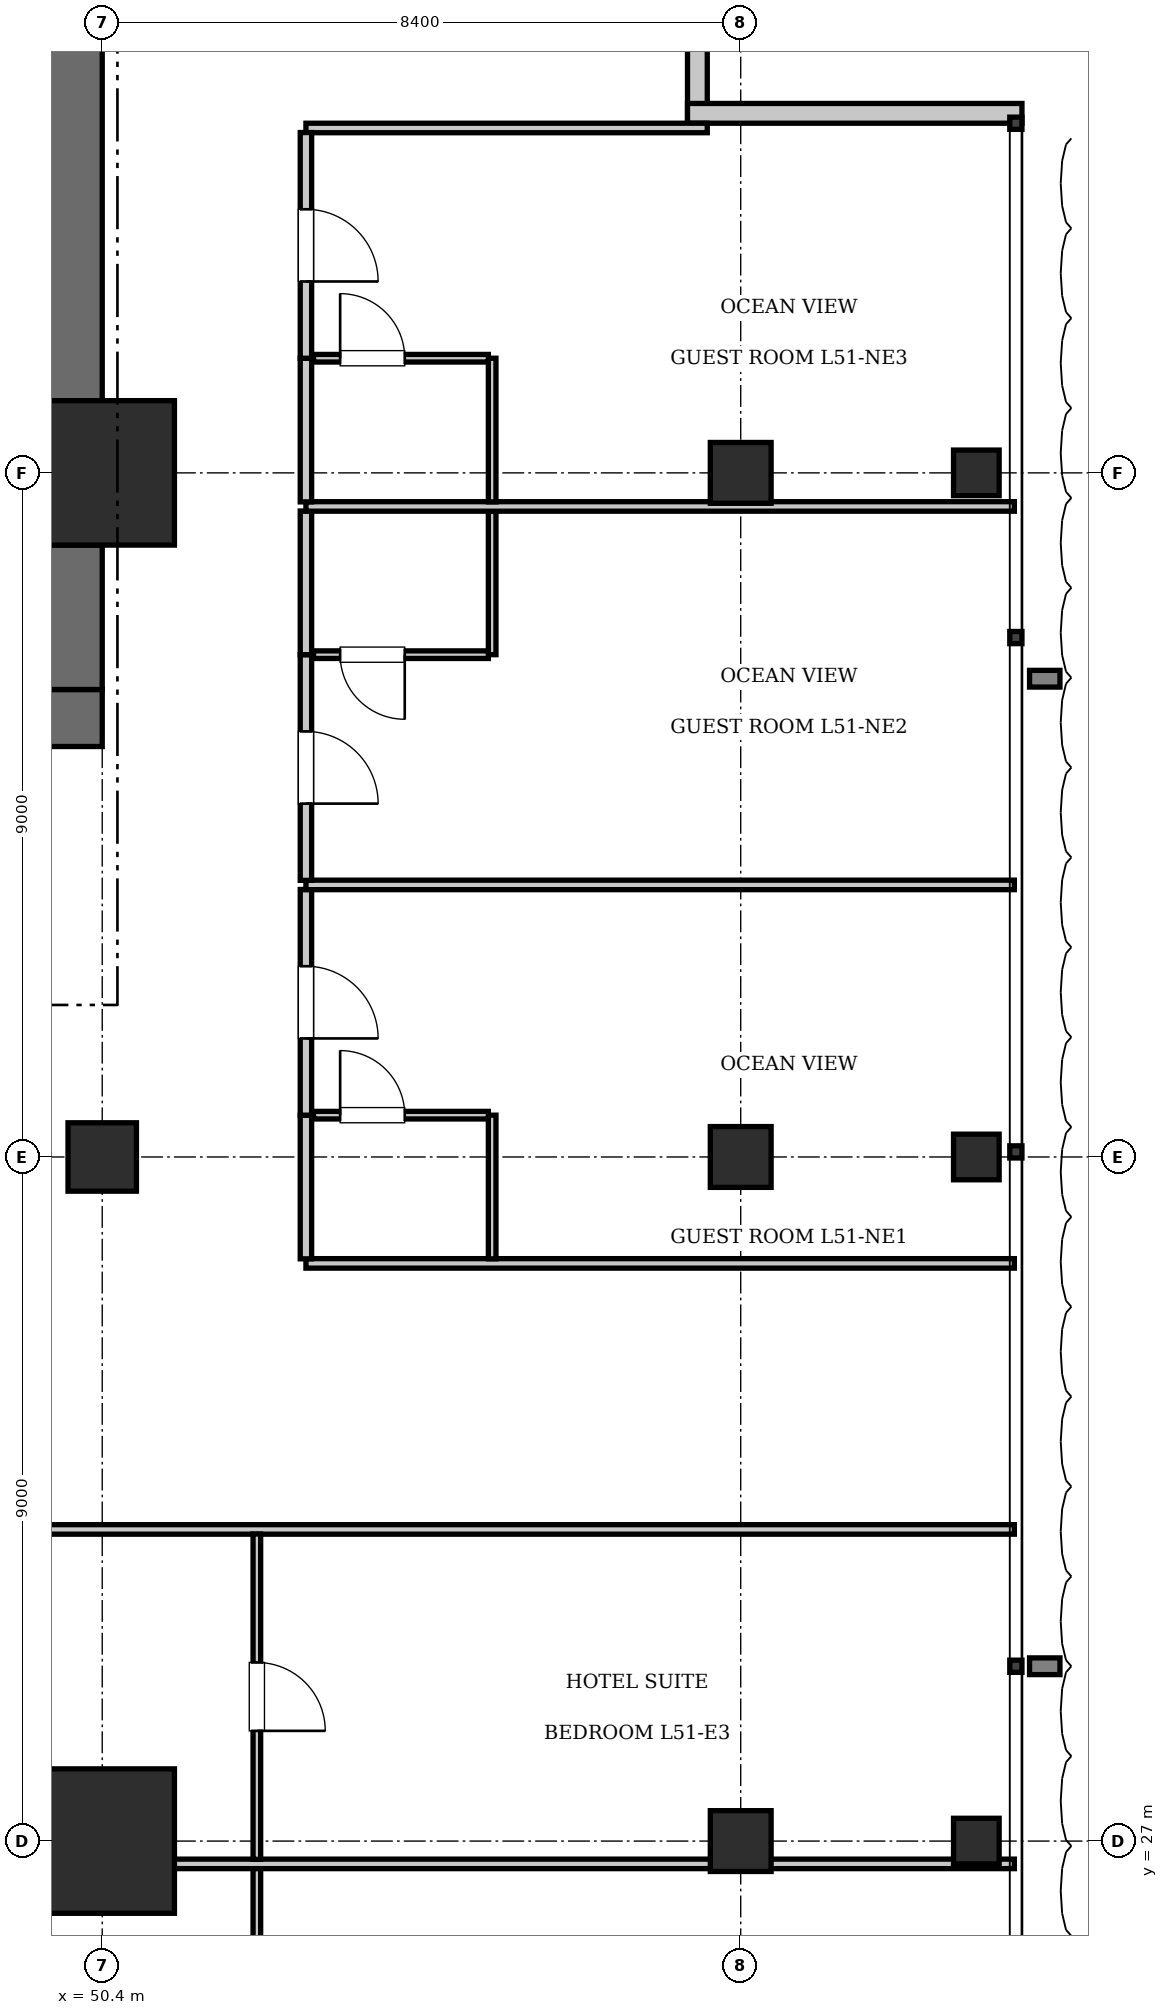
"""IFC4 building model, lengths in metres.
Left out: names, types, materials, properties, quantities, classifications, styles, units other than length and angle.
Written with IfcOpenShell. Run it as: python <this file> out.ifc"""

import sys

from ifc_helpers import new_model, si_unit, direction, frame, frame_2d, origin, origin_2d, place, context, subcontext, project, spatial, rectangle, i_section, extrude, element, fill, save


model = new_model("IFC4")
c1 = context("Model", 3, precision=1e-05, world=origin(), true_north=direction((0.0, 1.0)))
c2 = subcontext(c1, "Body", "Model", "MODEL_VIEW")
j1 = project(units=[si_unit("LENGTHUNIT", "METRE"), si_unit("PLANEANGLEUNIT", "RADIAN")], contexts=[c1])
p1 = place(None, origin())
s1 = spatial("IfcSite", under=j1, at=p1, CompositionType="ELEMENT")
p2 = place(p1, origin())
s2 = spatial("IfcBuilding", under=s1, at=p2, CompositionType="ELEMENT")
p3 = place(p2, frame((0.0, 0.0, 208.25)))
s3 = spatial("IfcBuildingStorey", under=s2, at=p3, CompositionType="ELEMENT", Elevation=208.25)
for number, where, z_axis, x_axis in (
    (1, (50.4, 27.0, 0.0), (0.0, 0.0, 1.0), (1.0, 0.0, 0.0)),
    (2, (50.4, 45.0, 0.0), (0.0, 0.0, 1.0), (1.0, 0.0, 0.0)),
):
    element("IfcColumn", number, at=place(p3, frame(where, z_axis=z_axis, x_axis=x_axis)), inside=s3, PredefinedType="COLUMN", context=c2, shape_type="SweptSolid", body=[
        extrude(rectangle(XDim=1.9, YDim=1.9, at=origin_2d()), origin(), (0.0, 0.0, 1.0), 3.85),
    ])
p4 = place(p3, frame((43.6, 41.775, 0.0), z_axis=(0.0, 0.0, 1.0), x_axis=(1.0, 0.0, 0.0)))
e3 = element("IfcWall", 3, at=p4, inside=s3, PredefinedType="SHEAR", context=c2, shape_type="SweptSolid", body=[
    extrude(rectangle(XDim=6.8, YDim=0.75, at=frame_2d((3.4, 0.0))), origin(), (0.0, 0.0, 1.0), 3.85),
])
p5 = place(p4, frame((3.9, 0.0, 0.0)))
e4 = element("IfcOpeningElement", 4, at=p5, cuts=e3, PredefinedType="OPENING", context=c2, shape_type="SweptSolid", body=[
    extrude(rectangle(XDim=1.15, YDim=2.15, at=frame_2d((0.575, 1.075))), frame((0.0, 0.385, 0.0), z_axis=(0.0, -1.0, 0.0), x_axis=(1.0, 0.0, 0.0)), (0.0, 0.0, 1.0), 0.77),
])
p6 = place(p4, frame((0.55, 0.0, 0.0)))
e5 = element("IfcOpeningElement", 5, at=p6, cuts=e3, PredefinedType="OPENING", context=c2, shape_type="SweptSolid", body=[
    extrude(rectangle(XDim=1.1, YDim=2.2, at=frame_2d((0.55, 1.1))), frame((0.0, 0.385, 0.0), z_axis=(0.0, -1.0, 0.0), x_axis=(1.0, 0.0, 0.0)), (0.0, 0.0, 1.0), 0.77),
])
p7 = place(p3, frame((50.025, 42.15, 0.0), z_axis=(0.0, 0.0, 1.0), x_axis=(0.0, 1.0, 0.0)))
e6 = element("IfcWall", 6, at=p7, inside=s3, PredefinedType="SHEAR", context=c2, shape_type="SweptSolid", body=[
    extrude(rectangle(XDim=1.9, YDim=0.75, at=frame_2d((0.95, 0.0))), origin(), (0.0, 0.0, 1.0), 3.85),
])
p8 = place(p3, frame((50.025, 45.95, 0.0), z_axis=(0.0, 0.0, 1.0), x_axis=(0.0, 1.0, 0.0)))
e7 = element("IfcWall", 7, at=p8, inside=s3, PredefinedType="SHEAR", context=c2, shape_type="SweptSolid", body=[
    extrude(rectangle(XDim=7.3, YDim=0.75, at=frame_2d((3.65, 0.0))), origin(), (0.0, 0.0, 1.0), 3.85),
])
p9 = place(p3, frame((50.4, 36.0, 0.0), z_axis=(0.0, 0.0, 1.0), x_axis=(1.0, 0.0, 0.0)))
e8 = element("IfcColumn", 8, at=p9, inside=s3, PredefinedType="COLUMN", context=c2, shape_type="SweptSolid", body=[
    extrude(rectangle(XDim=0.9, YDim=0.9, at=origin_2d()), origin(), (0.0, 0.0, 1.0), 3.85),
])
for number, where, z_axis, x_axis in (
    (9, (58.8, 27.0, 0.0), (0.0, 0.0, 1.0), (1.0, 0.0, 0.0)),
    (10, (58.8, 36.0, 0.0), (0.0, 0.0, 1.0), (1.0, 0.0, 0.0)),
    (11, (58.8, 45.0, 0.0), (0.0, 0.0, 1.0), (1.0, 0.0, 0.0)),
):
    element("IfcColumn", number, at=place(p3, frame(where, z_axis=z_axis, x_axis=x_axis)), inside=s3, PredefinedType="COLUMN", context=c2, shape_type="SweptSolid", body=[
        extrude(rectangle(XDim=0.8, YDim=0.8, at=origin_2d()), origin(), (0.0, 0.0, 1.0), 3.85),
    ])
for number, where, z_axis, x_axis in (
    (12, (61.9, 27.0, 0.0), (0.0, 0.0, 1.0), (1.0, 0.0, 0.0)),
    (13, (61.9, 36.0, 0.0), (0.0, 0.0, 1.0), (1.0, 0.0, 0.0)),
    (14, (61.9, 45.0, 0.0), (0.0, 0.0, 1.0), (1.0, 0.0, 0.0)),
):
    element("IfcColumn", number, at=place(p3, frame(where, z_axis=z_axis, x_axis=x_axis)), inside=s3, PredefinedType="COLUMN", context=c2, shape_type="SweptSolid", body=[
        extrude(i_section(OverallWidth=0.6, OverallDepth=0.6, WebThickness=0.025, FlangeThickness=0.038, at=origin_2d()), origin(), (0.0, 0.0, 1.0), 3.85),
    ])
for number, where, z_axis, x_axis in (
    (15, (58.23, 54.0, 0.0), (0.0, 0.0, 1.0), (0.0, -1.0, 0.0)),
    (16, (58.1, 49.73, 0.0), (0.0, 0.0, 1.0), (1.0, 0.0, 0.0)),
):
    element("IfcWall", number, at=place(p3, frame(where, z_axis=z_axis, x_axis=x_axis)), inside=s3, PredefinedType="SOLIDWALL", context=c2, shape_type="SweptSolid", body=[
        extrude(rectangle(XDim=4.4, YDim=0.26, at=frame_2d((2.2, 0.0))), origin(), (0.0, 0.0, 1.0), 3.61),
    ])
p10 = place(p3, frame((39.08, 31.1, 0.0), z_axis=(0.0, 0.0, 1.0), x_axis=(1.0, 0.0, 0.0)))
e17 = element("IfcWall", 17, at=p10, inside=s3, PredefinedType="PARTITIONING", context=c2, shape_type="SweptSolid", body=[
    extrude(rectangle(XDim=23.32, YDim=0.125, at=frame_2d((11.66, 0.0))), origin(), (0.0, 0.0, 1.0), 3.61),
])
p11 = place(p3, frame((52.434, 22.36, 0.0), z_axis=(0.0, 0.0, 1.0), x_axis=(0.0, 1.0, 0.0)))
e18 = element("IfcWall", 18, at=p11, inside=s3, PredefinedType="PARTITIONING", context=c2, shape_type="SweptSolid", body=[
    extrude(rectangle(XDim=4.28, YDim=0.1, at=frame_2d((2.14, 0.0))), origin(), (0.0, 0.0, 1.0), 3.61),
])
p12 = place(p11, frame((1.69, 0.0, 0.0)))
e19 = element("IfcOpeningElement", 19, at=p12, cuts=e18, PredefinedType="OPENING", context=c2, shape_type="SweptSolid", body=[
    extrude(rectangle(XDim=0.9, YDim=2.1, at=frame_2d((0.45, 1.05))), frame((0.0, 0.06, 0.0), z_axis=(0.0, -1.0, 0.0), x_axis=(1.0, 0.0, 0.0)), (0.0, 0.0, 1.0), 0.12),
])
p13 = place(p3, frame((39.08, 26.7, 0.0), z_axis=(0.0, 0.0, 1.0), x_axis=(1.0, 0.0, 0.0)))
e20 = element("IfcWall", 20, at=p13, inside=s3, PredefinedType="PARTITIONING", context=c2, shape_type="SweptSolid", body=[
    extrude(rectangle(XDim=23.32, YDim=0.125, at=frame_2d((11.66, 0.0))), origin(), (0.0, 0.0, 1.0), 3.61),
])
p14 = place(p3, frame((52.434, 26.76, 0.0), z_axis=(0.0, 0.0, 1.0), x_axis=(0.0, 1.0, 0.0)))
e21 = element("IfcWall", 21, at=p14, inside=s3, PredefinedType="PARTITIONING", context=c2, shape_type="SweptSolid", body=[
    extrude(rectangle(XDim=4.28, YDim=0.1, at=frame_2d((2.14, 0.0))), origin(), (0.0, 0.0, 1.0), 3.61),
])
p15 = place(p14, frame((1.69, 0.0, 0.0)))
e22 = element("IfcOpeningElement", 22, at=p15, cuts=e21, PredefinedType="OPENING", context=c2, shape_type="SweptSolid", body=[
    extrude(rectangle(XDim=0.9, YDim=2.1, at=frame_2d((0.45, 1.05))), frame((0.0, 0.06, 0.0), z_axis=(0.0, -1.0, 0.0), x_axis=(1.0, 0.0, 0.0)), (0.0, 0.0, 1.0), 0.12),
])
p16 = place(p3, frame((53.08, 34.6, 0.0), z_axis=(0.0, 0.0, 1.0), x_axis=(1.0, 0.0, 0.0)))
e23 = element("IfcWall", 23, at=p16, inside=s3, PredefinedType="PARTITIONING", context=c2, shape_type="SweptSolid", body=[
    extrude(rectangle(XDim=9.32, YDim=0.125, at=frame_2d((4.66, 0.0))), origin(), (0.0, 0.0, 1.0), 3.61),
])
p17 = place(p3, frame((53.08, 49.538, 0.0), z_axis=(0.0, 0.0, 1.0), x_axis=(1.0, 0.0, 0.0)))
e24 = element("IfcWall", 24, at=p17, inside=s3, PredefinedType="PARTITIONING", context=c2, shape_type="SweptSolid", body=[
    extrude(rectangle(XDim=5.28, YDim=0.125, at=frame_2d((2.64, 0.0))), origin(), (0.0, 0.0, 1.0), 3.61),
])
p18 = place(p3, frame((53.08, 34.66, 0.0), z_axis=(0.0, 0.0, 1.0), x_axis=(0.0, 1.0, 0.0)))
e25 = element("IfcWall", 25, at=p18, inside=s3, PredefinedType="PARTITIONING", context=c2, shape_type="SweptSolid", body=[
    extrude(rectangle(XDim=1.89, YDim=0.15, at=frame_2d((0.945, 0.0))), origin(), (0.0, 0.0, 1.0), 3.61),
])
p19 = place(p3, frame((53.08, 36.55, 0.0), z_axis=(0.0, 0.0, 1.0), x_axis=(0.0, 1.0, 0.0)))
e26 = element("IfcWall", 26, at=p19, inside=s3, PredefinedType="PARTITIONING", context=c2, shape_type="SweptSolid", body=[
    extrude(rectangle(XDim=2.969, YDim=0.15, at=frame_2d((1.485, 0.0))), origin(), (0.0, 0.0, 1.0), 3.61),
])
p20 = place(p19, frame((1.01, 0.0, 0.0)))
e27 = element("IfcOpeningElement", 27, at=p20, cuts=e26, PredefinedType="OPENING", context=c2, shape_type="SweptSolid", body=[
    extrude(rectangle(XDim=0.95, YDim=2.15, at=frame_2d((0.475, 1.075))), frame((0.0, 0.085, 0.0), z_axis=(0.0, -1.0, 0.0), x_axis=(1.0, 0.0, 0.0)), (0.0, 0.0, 1.0), 0.17),
])
p21 = place(p3, frame((55.53, 34.66, 0.0), z_axis=(0.0, 0.0, 1.0), x_axis=(0.0, 1.0, 0.0)))
e28 = element("IfcWall", 28, at=p21, inside=s3, PredefinedType="PARTITIONING", context=c2, shape_type="SweptSolid", body=[
    extrude(rectangle(XDim=1.89, YDim=0.1, at=frame_2d((0.945, 0.0))), origin(), (0.0, 0.0, 1.0), 3.61),
])
p22 = place(p3, frame((53.18, 36.55, 0.0), z_axis=(0.0, 0.0, 1.0), x_axis=(1.0, 0.0, 0.0)))
e29 = element("IfcWall", 29, at=p22, inside=s3, PredefinedType="PARTITIONING", context=c2, shape_type="SweptSolid", body=[
    extrude(rectangle(XDim=2.3, YDim=0.1, at=frame_2d((1.15, 0.0))), origin(), (0.0, 0.0, 1.0), 3.61),
])
p23 = place(p22, frame((0.35, 0.0, 0.0)))
e30 = element("IfcOpeningElement", 30, at=p23, cuts=e29, PredefinedType="OPENING", context=c2, shape_type="SweptSolid", body=[
    extrude(rectangle(XDim=0.85, YDim=2.1, at=frame_2d((0.425, 1.05))), frame((0.0, 0.06, 0.0), z_axis=(0.0, -1.0, 0.0), x_axis=(1.0, 0.0, 0.0)), (0.0, 0.0, 1.0), 0.12),
])
p24 = place(p3, frame((53.08, 39.579, 0.0), z_axis=(0.0, 0.0, 1.0), x_axis=(1.0, 0.0, 0.0)))
e31 = element("IfcWall", 31, at=p24, inside=s3, PredefinedType="PARTITIONING", context=c2, shape_type="SweptSolid", body=[
    extrude(rectangle(XDim=9.32, YDim=0.125, at=frame_2d((4.66, 0.0))), origin(), (0.0, 0.0, 1.0), 3.61),
])
p25 = place(p3, frame((53.08, 39.639, 0.0), z_axis=(0.0, 0.0, 1.0), x_axis=(0.0, 1.0, 0.0)))
e32 = element("IfcWall", 32, at=p25, inside=s3, PredefinedType="PARTITIONING", context=c2, shape_type="SweptSolid", body=[
    extrude(rectangle(XDim=2.969, YDim=0.15, at=frame_2d((1.485, 0.0))), origin(), (0.0, 0.0, 1.0), 3.61),
])
p26 = place(p25, frame((1.01, 0.0, 0.0)))
e33 = element("IfcOpeningElement", 33, at=p26, cuts=e32, PredefinedType="OPENING", context=c2, shape_type="SweptSolid", body=[
    extrude(rectangle(XDim=0.95, YDim=2.15, at=frame_2d((0.475, 1.075))), frame((0.0, 0.085, 0.0), z_axis=(0.0, -1.0, 0.0), x_axis=(1.0, 0.0, 0.0)), (0.0, 0.0, 1.0), 0.17),
])
p27 = place(p3, frame((53.08, 42.608, 0.0), z_axis=(0.0, 0.0, 1.0), x_axis=(0.0, 1.0, 0.0)))
e34 = element("IfcWall", 34, at=p27, inside=s3, PredefinedType="PARTITIONING", context=c2, shape_type="SweptSolid", body=[
    extrude(rectangle(XDim=1.89, YDim=0.15, at=frame_2d((0.945, 0.0))), origin(), (0.0, 0.0, 1.0), 3.61),
])
p28 = place(p3, frame((55.53, 42.608, 0.0), z_axis=(0.0, 0.0, 1.0), x_axis=(0.0, 1.0, 0.0)))
e35 = element("IfcWall", 35, at=p28, inside=s3, PredefinedType="PARTITIONING", context=c2, shape_type="SweptSolid", body=[
    extrude(rectangle(XDim=1.89, YDim=0.1, at=frame_2d((0.945, 0.0))), origin(), (0.0, 0.0, 1.0), 3.61),
])
p29 = place(p3, frame((53.18, 42.608, 0.0), z_axis=(0.0, 0.0, 1.0), x_axis=(1.0, 0.0, 0.0)))
e36 = element("IfcWall", 36, at=p29, inside=s3, PredefinedType="PARTITIONING", context=c2, shape_type="SweptSolid", body=[
    extrude(rectangle(XDim=2.3, YDim=0.1, at=frame_2d((1.15, 0.0))), origin(), (0.0, 0.0, 1.0), 3.61),
])
p30 = place(p29, frame((0.35, 0.0, 0.0)))
e37 = element("IfcOpeningElement", 37, at=p30, cuts=e36, PredefinedType="OPENING", context=c2, shape_type="SweptSolid", body=[
    extrude(rectangle(XDim=0.85, YDim=2.1, at=frame_2d((0.425, 1.05))), frame((0.0, 0.06, 0.0), z_axis=(0.0, -1.0, 0.0), x_axis=(1.0, 0.0, 0.0)), (0.0, 0.0, 1.0), 0.12),
])
p31 = place(p3, frame((53.08, 44.558, 0.0), z_axis=(0.0, 0.0, 1.0), x_axis=(1.0, 0.0, 0.0)))
e38 = element("IfcWall", 38, at=p31, inside=s3, PredefinedType="PARTITIONING", context=c2, shape_type="SweptSolid", body=[
    extrude(rectangle(XDim=9.32, YDim=0.125, at=frame_2d((4.66, 0.0))), origin(), (0.0, 0.0, 1.0), 3.61),
])
p32 = place(p3, frame((53.08, 44.618, 0.0), z_axis=(0.0, 0.0, 1.0), x_axis=(0.0, 1.0, 0.0)))
e39 = element("IfcWall", 39, at=p32, inside=s3, PredefinedType="PARTITIONING", context=c2, shape_type="SweptSolid", body=[
    extrude(rectangle(XDim=1.89, YDim=0.15, at=frame_2d((0.945, 0.0))), origin(), (0.0, 0.0, 1.0), 3.61),
])
p33 = place(p3, frame((53.08, 46.508, 0.0), z_axis=(0.0, 0.0, 1.0), x_axis=(0.0, 1.0, 0.0)))
e40 = element("IfcWall", 40, at=p33, inside=s3, PredefinedType="PARTITIONING", context=c2, shape_type="SweptSolid", body=[
    extrude(rectangle(XDim=2.969, YDim=0.15, at=frame_2d((1.485, 0.0))), origin(), (0.0, 0.0, 1.0), 3.61),
])
p34 = place(p33, frame((1.01, 0.0, 0.0)))
e41 = element("IfcOpeningElement", 41, at=p34, cuts=e40, PredefinedType="OPENING", context=c2, shape_type="SweptSolid", body=[
    extrude(rectangle(XDim=0.95, YDim=2.15, at=frame_2d((0.475, 1.075))), frame((0.0, 0.085, 0.0), z_axis=(0.0, -1.0, 0.0), x_axis=(1.0, 0.0, 0.0)), (0.0, 0.0, 1.0), 0.17),
])
p35 = place(p3, frame((55.53, 44.618, 0.0), z_axis=(0.0, 0.0, 1.0), x_axis=(0.0, 1.0, 0.0)))
e42 = element("IfcWall", 42, at=p35, inside=s3, PredefinedType="PARTITIONING", context=c2, shape_type="SweptSolid", body=[
    extrude(rectangle(XDim=1.89, YDim=0.1, at=frame_2d((0.945, 0.0))), origin(), (0.0, 0.0, 1.0), 3.61),
])
p36 = place(p3, frame((53.18, 46.508, 0.0), z_axis=(0.0, 0.0, 1.0), x_axis=(1.0, 0.0, 0.0)))
e43 = element("IfcWall", 43, at=p36, inside=s3, PredefinedType="PARTITIONING", context=c2, shape_type="SweptSolid", body=[
    extrude(rectangle(XDim=2.3, YDim=0.1, at=frame_2d((1.15, 0.0))), origin(), (0.0, 0.0, 1.0), 3.61),
])
p37 = place(p36, frame((0.35, 0.0, 0.0)))
e44 = element("IfcOpeningElement", 44, at=p37, cuts=e43, PredefinedType="OPENING", context=c2, shape_type="SweptSolid", body=[
    extrude(rectangle(XDim=0.85, YDim=2.1, at=frame_2d((0.425, 1.05))), frame((0.0, 0.06, 0.0), z_axis=(0.0, -1.0, 0.0), x_axis=(1.0, 0.0, 0.0)), (0.0, 0.0, 1.0), 0.12),
])
p38 = place(p15, frame((0.9, 0.0, 0.0), z_axis=(0.0, 0.0, 1.0), x_axis=(-1.0, 0.0, 0.0)))
e45 = element("IfcDoor", 45, at=p38, inside=s3, OperationType="SINGLE_SWING_RIGHT", PredefinedType="DOOR", context=c2, shape_type="SweptSolid", body=[
    extrude(rectangle(XDim=0.9, YDim=2.1, at=frame_2d((0.45, 1.05))), frame((0.0, 0.025, 0.0), z_axis=(0.0, -1.0, 0.0), x_axis=(1.0, 0.0, 0.0)), (0.0, 0.0, 1.0), 0.05),
])
fill(e22, e45)
p39 = place(p23, origin())
e46 = element("IfcDoor", 46, at=p39, inside=s3, OperationType="SINGLE_SWING_LEFT", PredefinedType="DOOR", context=c2, shape_type="SweptSolid", body=[
    extrude(rectangle(XDim=0.85, YDim=2.1, at=frame_2d((0.425, 1.05))), frame((0.0, 0.025, 0.0), z_axis=(0.0, -1.0, 0.0), x_axis=(1.0, 0.0, 0.0)), (0.0, 0.0, 1.0), 0.05),
])
fill(e30, e46)
p40 = place(p20, frame((0.95, 0.0, 0.0), z_axis=(0.0, 0.0, 1.0), x_axis=(-1.0, 0.0, 0.0)))
e47 = element("IfcDoor", 47, at=p40, inside=s3, OperationType="SINGLE_SWING_RIGHT", PredefinedType="DOOR", context=c2, shape_type="SweptSolid", body=[
    extrude(rectangle(XDim=0.95, YDim=2.15, at=frame_2d((0.475, 1.075))), frame((0.0, 0.025, 0.0), z_axis=(0.0, -1.0, 0.0), x_axis=(1.0, 0.0, 0.0)), (0.0, 0.0, 1.0), 0.05),
])
fill(e27, e47)
p41 = place(p30, frame((0.85, 0.0, 0.0), z_axis=(0.0, 0.0, 1.0), x_axis=(-1.0, 0.0, 0.0)))
e48 = element("IfcDoor", 48, at=p41, inside=s3, OperationType="SINGLE_SWING_LEFT", PredefinedType="DOOR", context=c2, shape_type="SweptSolid", body=[
    extrude(rectangle(XDim=0.85, YDim=2.1, at=frame_2d((0.425, 1.05))), frame((0.0, 0.025, 0.0), z_axis=(0.0, -1.0, 0.0), x_axis=(1.0, 0.0, 0.0)), (0.0, 0.0, 1.0), 0.05),
])
fill(e37, e48)
p42 = place(p26, frame((0.95, 0.0, 0.0), z_axis=(0.0, 0.0, 1.0), x_axis=(-1.0, 0.0, 0.0)))
e49 = element("IfcDoor", 49, at=p42, inside=s3, OperationType="SINGLE_SWING_RIGHT", PredefinedType="DOOR", context=c2, shape_type="SweptSolid", body=[
    extrude(rectangle(XDim=0.95, YDim=2.15, at=frame_2d((0.475, 1.075))), frame((0.0, 0.025, 0.0), z_axis=(0.0, -1.0, 0.0), x_axis=(1.0, 0.0, 0.0)), (0.0, 0.0, 1.0), 0.05),
])
fill(e33, e49)
p43 = place(p37, origin())
e50 = element("IfcDoor", 50, at=p43, inside=s3, OperationType="SINGLE_SWING_LEFT", PredefinedType="DOOR", context=c2, shape_type="SweptSolid", body=[
    extrude(rectangle(XDim=0.85, YDim=2.1, at=frame_2d((0.425, 1.05))), frame((0.0, 0.025, 0.0), z_axis=(0.0, -1.0, 0.0), x_axis=(1.0, 0.0, 0.0)), (0.0, 0.0, 1.0), 0.05),
])
fill(e44, e50)
p44 = place(p34, frame((0.95, 0.0, 0.0), z_axis=(0.0, 0.0, 1.0), x_axis=(-1.0, 0.0, 0.0)))
e51 = element("IfcDoor", 51, at=p44, inside=s3, OperationType="SINGLE_SWING_RIGHT", PredefinedType="DOOR", context=c2, shape_type="SweptSolid", body=[
    extrude(rectangle(XDim=0.95, YDim=2.15, at=frame_2d((0.475, 1.075))), frame((0.0, 0.025, 0.0), z_axis=(0.0, -1.0, 0.0), x_axis=(1.0, 0.0, 0.0)), (0.0, 0.0, 1.0), 0.05),
])
fill(e41, e51)
save(model, sys.argv[1])
